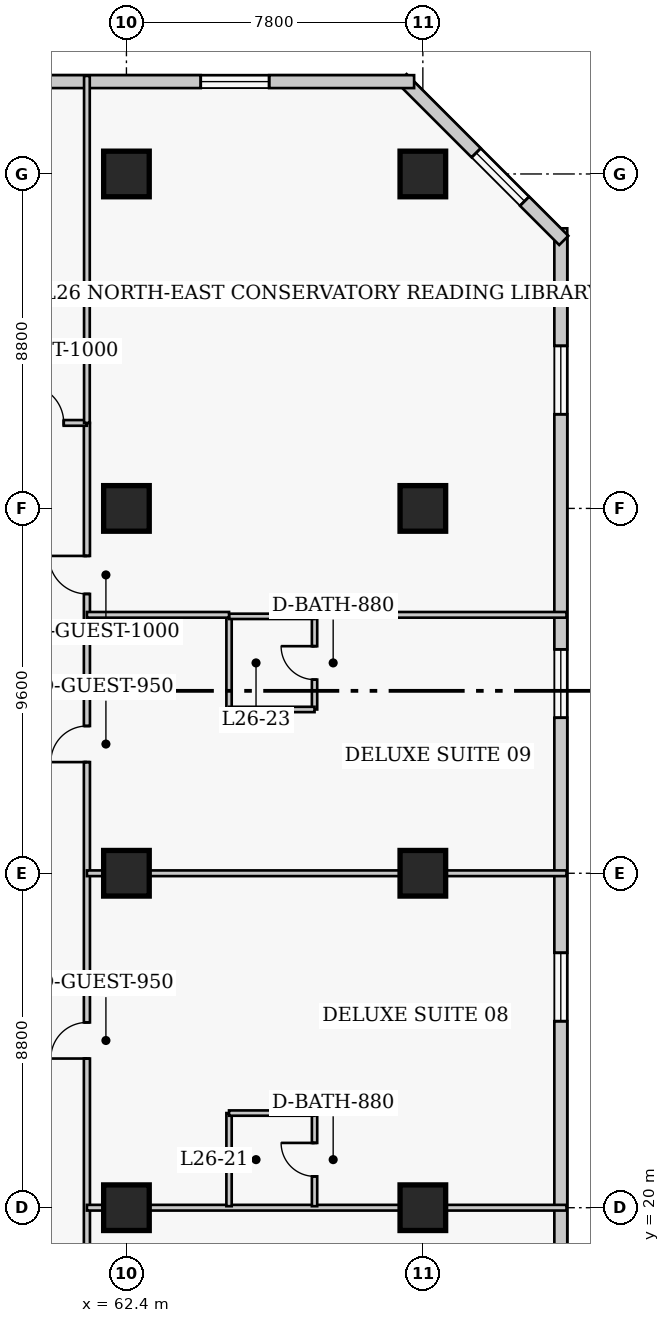
"""IFC4 building model, lengths in metres.
Left out: names, types, materials, properties, quantities, classifications, styles, units other than length and angle.
Written with IfcOpenShell. Run it as: python <this file> out.ifc"""

import sys

from ifc_helpers import new_model, si_unit, direction, frame, frame_2d, origin, origin_2d, place, context, subcontext, project, spatial, rectangle, extrude, element, fill, save


model = new_model("IFC4")
c1 = context("Model", 3, precision=1e-05, world=origin(), true_north=direction((0.0, 1.0)))
c2 = subcontext(c1, "Body", "Model", "MODEL_VIEW")
j1 = project(units=[si_unit("LENGTHUNIT", "METRE"), si_unit("PLANEANGLEUNIT", "RADIAN")], contexts=[c1])
p1 = place(None, origin())
s1 = spatial("IfcSite", under=j1, at=p1, CompositionType="ELEMENT")
p2 = place(p1, origin())
s2 = spatial("IfcBuilding", under=s1, at=p2, CompositionType="ELEMENT")
p3 = place(p2, frame((0.0, 0.0, 107.0)))
s3 = spatial("IfcBuildingStorey", under=s2, at=p3, CompositionType="ELEMENT", Elevation=107.0)
for number, where, z_axis, x_axis in (
    (1, (62.4, 20.0, 0.0), (0.0, 0.0, 1.0), (1.0, 0.0, 0.0)),
    (2, (62.4, 28.8, 0.0), (0.0, 0.0, 1.0), (1.0, 0.0, 0.0)),
    (3, (62.4, 38.4, 0.0), (0.0, 0.0, 1.0), (1.0, 0.0, 0.0)),
    (4, (62.4, 47.2, 0.0), (0.0, 0.0, 1.0), (1.0, 0.0, 0.0)),
    (5, (70.2, 20.0, 0.0), (0.0, 0.0, 1.0), (1.0, 0.0, 0.0)),
    (6, (70.2, 28.8, 0.0), (0.0, 0.0, 1.0), (1.0, 0.0, 0.0)),
    (7, (70.2, 38.4, 0.0), (0.0, 0.0, 1.0), (1.0, 0.0, 0.0)),
    (8, (70.2, 47.2, 0.0), (0.0, 0.0, 1.0), (1.0, 0.0, 0.0)),
):
    element("IfcColumn", number, at=place(p3, frame(where, z_axis=z_axis, x_axis=x_axis)), inside=s3, PredefinedType="COLUMN", context=c2, shape_type="SweptSolid", body=[
        extrude(rectangle(XDim=1.2, YDim=1.2, at=origin_2d()), origin(), (0.0, 0.0, 1.0), 3.8),
    ])
p4 = place(p3, frame((73.83, 13.83, 0.0), z_axis=(0.0, 0.0, 1.0), x_axis=(0.0, 1.0, 0.0)))
e9 = element("IfcWall", 9, at=p4, inside=s3, PredefinedType="SOLIDWALL", context=c2, shape_type="SweptSolid", body=[
    extrude(rectangle(XDim=31.94, YDim=0.34, at=frame_2d((15.97, 0.0))), origin(), (0.0, 0.0, 1.0), 3.54),
])
p5 = place(p4, frame((3.093, 0.0, 0.85)))
e10 = element("IfcOpeningElement", 10, at=p5, cuts=e9, PredefinedType="OPENING", context=c2, shape_type="SweptSolid", body=[
    extrude(rectangle(XDim=1.8, YDim=1.8, at=frame_2d((0.9, 0.9))), frame((0.0, 0.18, 0.0), z_axis=(0.0, -1.0, 0.0), x_axis=(1.0, 0.0, 0.0)), (0.0, 0.0, 1.0), 0.36),
])
p6 = place(p4, frame((11.077, 0.0, 0.85)))
e11 = element("IfcOpeningElement", 11, at=p6, cuts=e9, PredefinedType="OPENING", context=c2, shape_type="SweptSolid", body=[
    extrude(rectangle(XDim=1.8, YDim=1.8, at=frame_2d((0.9, 0.9))), frame((0.0, 0.18, 0.0), z_axis=(0.0, -1.0, 0.0), x_axis=(1.0, 0.0, 0.0)), (0.0, 0.0, 1.0), 0.36),
])
p7 = place(p4, frame((19.062, 0.0, 0.85)))
e12 = element("IfcOpeningElement", 12, at=p7, cuts=e9, PredefinedType="OPENING", context=c2, shape_type="SweptSolid", body=[
    extrude(rectangle(XDim=1.8, YDim=1.8, at=frame_2d((0.9, 0.9))), frame((0.0, 0.18, 0.0), z_axis=(0.0, -1.0, 0.0), x_axis=(1.0, 0.0, 0.0)), (0.0, 0.0, 1.0), 0.36),
])
p8 = place(p4, frame((27.048, 0.0, 0.85)))
e13 = element("IfcOpeningElement", 13, at=p8, cuts=e9, PredefinedType="OPENING", context=c2, shape_type="SweptSolid", body=[
    extrude(rectangle(XDim=1.8, YDim=1.8, at=frame_2d((0.9, 0.9))), frame((0.0, 0.18, 0.0), z_axis=(0.0, -1.0, 0.0), x_axis=(1.0, 0.0, 0.0)), (0.0, 0.0, 1.0), 0.36),
])
p9 = place(p3, frame((73.908, 45.451, 0.0), z_axis=(0.0, 0.0, 1.0), x_axis=(-0.707106781187, 0.707106781187, 0.0)))
e14 = element("IfcWall", 14, at=p9, inside=s3, PredefinedType="SOLIDWALL", context=c2, shape_type="SweptSolid", body=[
    extrude(rectangle(XDim=6.02, YDim=0.34, at=frame_2d((3.01, 0.0))), origin(), (0.0, 0.0, 1.0), 3.54),
])
p10 = place(p9, frame((1.46, 0.0, 0.85)))
e15 = element("IfcOpeningElement", 15, at=p10, cuts=e14, PredefinedType="OPENING", context=c2, shape_type="SweptSolid", body=[
    extrude(rectangle(XDim=1.8, YDim=1.8, at=frame_2d((0.9, 0.9))), frame((0.0, 0.18, 0.0), z_axis=(0.0, -1.0, 0.0), x_axis=(1.0, 0.0, 0.0)), (0.0, 0.0, 1.0), 0.36),
])
p11 = place(p3, frame((69.97, 49.63, 0.0), z_axis=(0.0, 0.0, 1.0), x_axis=(-1.0, 0.0, 0.0)))
e16 = element("IfcWall", 16, at=p11, inside=s3, PredefinedType="SOLIDWALL", context=c2, shape_type="SweptSolid", body=[
    extrude(rectangle(XDim=28.29, YDim=0.34, at=frame_2d((14.145, 0.0))), origin(), (0.0, 0.0, 1.0), 3.54),
])
p12 = place(p11, frame((3.815, 0.0, 0.85)))
e17 = element("IfcOpeningElement", 17, at=p12, cuts=e16, PredefinedType="OPENING", context=c2, shape_type="SweptSolid", body=[
    extrude(rectangle(XDim=1.8, YDim=1.8, at=frame_2d((0.9, 0.9))), frame((0.0, 0.18, 0.0), z_axis=(0.0, -1.0, 0.0), x_axis=(1.0, 0.0, 0.0)), (0.0, 0.0, 1.0), 0.36),
])
p13 = place(p11, frame((13.245, 0.0, 0.85)))
e18 = element("IfcOpeningElement", 18, at=p13, cuts=e16, PredefinedType="OPENING", context=c2, shape_type="SweptSolid", body=[
    extrude(rectangle(XDim=1.8, YDim=1.8, at=frame_2d((0.9, 0.9))), frame((0.0, 0.18, 0.0), z_axis=(0.0, -1.0, 0.0), x_axis=(1.0, 0.0, 0.0)), (0.0, 0.0, 1.0), 0.36),
])
p14 = place(p11, frame((22.675, 0.0, 0.85)))
e19 = element("IfcOpeningElement", 19, at=p14, cuts=e16, PredefinedType="OPENING", context=c2, shape_type="SweptSolid", body=[
    extrude(rectangle(XDim=1.8, YDim=1.8, at=frame_2d((0.9, 0.9))), frame((0.0, 0.18, 0.0), z_axis=(0.0, -1.0, 0.0), x_axis=(1.0, 0.0, 0.0)), (0.0, 0.0, 1.0), 0.36),
])
p15 = place(p3, frame((61.36, 11.85, 0.0), z_axis=(0.0, 0.0, 1.0), x_axis=(0.0, 1.0, 0.0)))
e20 = element("IfcWall", 20, at=p15, inside=s3, PredefinedType="PARTITIONING", context=c2, shape_type="SweptSolid", body=[
    extrude(rectangle(XDim=28.8, YDim=0.16, at=frame_2d((14.4, 0.0))), origin(), (0.0, 0.0, 1.0), 3.54),
])
p16 = place(p15, frame((3.6, 0.0, 0.0)))
e21 = element("IfcOpeningElement", 21, at=p16, cuts=e20, PredefinedType="OPENING", context=c2, shape_type="SweptSolid", body=[
    extrude(rectangle(XDim=0.95, YDim=2.1, at=frame_2d((0.475, 1.05))), frame((0.0, 0.09, 0.0), z_axis=(0.0, -1.0, 0.0), x_axis=(1.0, 0.0, 0.0)), (0.0, 0.0, 1.0), 0.18),
])
p17 = place(p15, frame((12.075, 0.0, 0.0)))
e22 = element("IfcOpeningElement", 22, at=p17, cuts=e20, PredefinedType="OPENING", context=c2, shape_type="SweptSolid", body=[
    extrude(rectangle(XDim=0.95, YDim=2.1, at=frame_2d((0.475, 1.05))), frame((0.0, 0.09, 0.0), z_axis=(0.0, -1.0, 0.0), x_axis=(1.0, 0.0, 0.0)), (0.0, 0.0, 1.0), 0.18),
])
p18 = place(p15, frame((19.875, 0.0, 0.0)))
e23 = element("IfcOpeningElement", 23, at=p18, cuts=e20, PredefinedType="OPENING", context=c2, shape_type="SweptSolid", body=[
    extrude(rectangle(XDim=0.95, YDim=2.1, at=frame_2d((0.475, 1.05))), frame((0.0, 0.09, 0.0), z_axis=(0.0, -1.0, 0.0), x_axis=(1.0, 0.0, 0.0)), (0.0, 0.0, 1.0), 0.18),
])
p19 = place(p15, frame((24.3, 0.0, 0.0)))
e24 = element("IfcOpeningElement", 24, at=p19, cuts=e20, PredefinedType="OPENING", context=c2, shape_type="SweptSolid", body=[
    extrude(rectangle(XDim=1.0, YDim=2.15, at=frame_2d((0.5, 1.075))), frame((0.0, 0.09, 0.0), z_axis=(0.0, -1.0, 0.0), x_axis=(1.0, 0.0, 0.0)), (0.0, 0.0, 1.0), 0.18),
])
p20 = place(p3, frame((56.8, 40.65, 0.0), z_axis=(0.0, 0.0, 1.0), x_axis=(1.0, 0.0, 0.0)))
e25 = element("IfcWall", 25, at=p20, inside=s3, PredefinedType="PARTITIONING", context=c2, shape_type="SweptSolid", body=[
    extrude(rectangle(XDim=4.56, YDim=0.15, at=frame_2d((2.28, 0.0))), origin(), (0.0, 0.0, 1.0), 3.54),
])
p21 = place(p20, frame((2.95, 0.0, 0.0)))
e26 = element("IfcOpeningElement", 26, at=p21, cuts=e25, PredefinedType="OPENING", context=c2, shape_type="SweptSolid", body=[
    extrude(rectangle(XDim=1.0, YDim=2.15, at=frame_2d((0.5, 1.075))), frame((0.0, 0.085, 0.0), z_axis=(0.0, -1.0, 0.0), x_axis=(1.0, 0.0, 0.0)), (0.0, 0.0, 1.0), 0.17),
])
p22 = place(p3, frame((61.36, 40.65, 0.0), z_axis=(0.0, 0.0, 1.0), x_axis=(0.0, 1.0, 0.0)))
e27 = element("IfcWall", 27, at=p22, inside=s3, PredefinedType="PARTITIONING", context=c2, shape_type="SweptSolid", body=[
    extrude(rectangle(XDim=9.13, YDim=0.15, at=frame_2d((4.565, 0.0))), origin(), (0.0, 0.0, 1.0), 3.54),
])
p23 = place(p3, frame((61.36, 20.0, 0.0), z_axis=(0.0, 0.0, 1.0), x_axis=(1.0, 0.0, 0.0)))
e28 = element("IfcWall", 28, at=p23, inside=s3, PredefinedType="PARTITIONING", context=c2, shape_type="SweptSolid", body=[
    extrude(rectangle(XDim=12.62, YDim=0.15, at=frame_2d((6.31, 0.0))), origin(), (0.0, 0.0, 1.0), 2.679),
])
p24 = place(p3, frame((65.1, 20.04, 0.0), z_axis=(0.0, 0.0, 1.0), x_axis=(0.0, 1.0, 0.0)))
e29 = element("IfcWall", 29, at=p24, inside=s3, PredefinedType="PLUMBINGWALL", context=c2, shape_type="SweptSolid", body=[
    extrude(rectangle(XDim=2.45, YDim=0.14, at=frame_2d((1.225, 0.0))), origin(), (0.0, 0.0, 1.0), 3.54),
])
p25 = place(p3, frame((67.35, 20.04, 0.0), z_axis=(0.0, 0.0, 1.0), x_axis=(0.0, 1.0, 0.0)))
e30 = element("IfcWall", 30, at=p25, inside=s3, PredefinedType="PLUMBINGWALL", context=c2, shape_type="SweptSolid", body=[
    extrude(rectangle(XDim=2.45, YDim=0.14, at=frame_2d((1.225, 0.0))), origin(), (0.0, 0.0, 1.0), 3.54),
])
p26 = place(p25, frame((0.785, 0.0, 0.0)))
e31 = element("IfcOpeningElement", 31, at=p26, cuts=e30, PredefinedType="OPENING", context=c2, shape_type="SweptSolid", body=[
    extrude(rectangle(XDim=0.88, YDim=2.05, at=frame_2d((0.44, 1.025))), frame((0.0, 0.08, 0.0), z_axis=(0.0, -1.0, 0.0), x_axis=(1.0, 0.0, 0.0)), (0.0, 0.0, 1.0), 0.16),
])
p27 = place(p3, frame((65.1, 22.49, 0.0), z_axis=(0.0, 0.0, 1.0), x_axis=(1.0, 0.0, 0.0)))
e32 = element("IfcWall", 32, at=p27, inside=s3, PredefinedType="PLUMBINGWALL", context=c2, shape_type="SweptSolid", body=[
    extrude(rectangle(XDim=2.25, YDim=0.14, at=frame_2d((1.125, 0.0))), origin(), (0.0, 0.0, 1.0), 3.54),
])
p28 = place(p3, frame((61.36, 28.8, 0.0), z_axis=(0.0, 0.0, 1.0), x_axis=(1.0, 0.0, 0.0)))
e33 = element("IfcWall", 33, at=p28, inside=s3, PredefinedType="PARTITIONING", context=c2, shape_type="SweptSolid", body=[
    extrude(rectangle(XDim=12.62, YDim=0.15, at=frame_2d((6.31, 0.0))), origin(), (0.0, 0.0, 1.0), 2.679),
])
p29 = place(p3, frame((65.1, 33.11, 0.0), z_axis=(0.0, 0.0, 1.0), x_axis=(0.0, 1.0, 0.0)))
e34 = element("IfcWall", 34, at=p29, inside=s3, PredefinedType="PLUMBINGWALL", context=c2, shape_type="SweptSolid", body=[
    extrude(rectangle(XDim=2.45, YDim=0.14, at=frame_2d((1.225, 0.0))), origin(), (0.0, 0.0, 1.0), 3.54),
])
p30 = place(p3, frame((67.35, 33.11, 0.0), z_axis=(0.0, 0.0, 1.0), x_axis=(0.0, 1.0, 0.0)))
e35 = element("IfcWall", 35, at=p30, inside=s3, PredefinedType="PLUMBINGWALL", context=c2, shape_type="SweptSolid", body=[
    extrude(rectangle(XDim=2.45, YDim=0.14, at=frame_2d((1.225, 0.0))), origin(), (0.0, 0.0, 1.0), 3.54),
])
p31 = place(p30, frame((0.785, 0.0, 0.0)))
e36 = element("IfcOpeningElement", 36, at=p31, cuts=e35, PredefinedType="OPENING", context=c2, shape_type="SweptSolid", body=[
    extrude(rectangle(XDim=0.88, YDim=2.05, at=frame_2d((0.44, 1.025))), frame((0.0, 0.08, 0.0), z_axis=(0.0, -1.0, 0.0), x_axis=(1.0, 0.0, 0.0)), (0.0, 0.0, 1.0), 0.16),
])
for number, where, z_axis, x_axis in (
    (37, (65.1, 33.11, 0.0), (0.0, 0.0, 1.0), (1.0, 0.0, 0.0)),
    (38, (65.1, 35.56, 0.0), (0.0, 0.0, 1.0), (1.0, 0.0, 0.0)),
):
    element("IfcWall", number, at=place(p3, frame(where, z_axis=z_axis, x_axis=x_axis)), inside=s3, PredefinedType="PLUMBINGWALL", context=c2, shape_type="SweptSolid", body=[
        extrude(rectangle(XDim=2.25, YDim=0.14, at=frame_2d((1.125, 0.0))), origin(), (0.0, 0.0, 1.0), 3.54),
    ])
p32 = place(p3, frame((61.36, 35.6, 0.0), z_axis=(0.0, 0.0, 1.0), x_axis=(1.0, 0.0, 0.0)))
e39 = element("IfcWall", 39, at=p32, inside=s3, PredefinedType="PARTITIONING", context=c2, shape_type="SweptSolid", body=[
    extrude(rectangle(XDim=3.74, YDim=0.15, at=frame_2d((1.87, 0.0))), origin(), (0.0, 0.0, 1.0), 3.54),
])
p33 = place(p3, frame((67.35, 35.6, 0.0), z_axis=(0.0, 0.0, 1.0), x_axis=(1.0, 0.0, 0.0)))
e40 = element("IfcWall", 40, at=p33, inside=s3, PredefinedType="PARTITIONING", context=c2, shape_type="SweptSolid", body=[
    extrude(rectangle(XDim=6.63, YDim=0.15, at=frame_2d((3.315, 0.0))), origin(), (0.0, 0.0, 1.0), 3.54),
])
p34 = place(p6, origin())
e41 = element("IfcWindow", 41, at=p34, inside=s3, PartitioningType="SINGLE_PANEL", PredefinedType="WINDOW", context=c2, shape_type="SweptSolid", body=[
    extrude(rectangle(XDim=1.8, YDim=1.8, at=frame_2d((0.9, 0.9))), frame((0.0, 0.03, 0.0), z_axis=(0.0, -1.0, 0.0), x_axis=(1.0, 0.0, 0.0)), (0.0, 0.0, 1.0), 0.06),
])
fill(e11, e41)
p35 = place(p7, origin())
e42 = element("IfcWindow", 42, at=p35, inside=s3, PartitioningType="SINGLE_PANEL", PredefinedType="WINDOW", context=c2, shape_type="SweptSolid", body=[
    extrude(rectangle(XDim=1.8, YDim=1.8, at=frame_2d((0.9, 0.9))), frame((0.0, 0.03, 0.0), z_axis=(0.0, -1.0, 0.0), x_axis=(1.0, 0.0, 0.0)), (0.0, 0.0, 1.0), 0.06),
])
fill(e12, e42)
p36 = place(p8, origin())
e43 = element("IfcWindow", 43, at=p36, inside=s3, PartitioningType="SINGLE_PANEL", PredefinedType="WINDOW", context=c2, shape_type="SweptSolid", body=[
    extrude(rectangle(XDim=1.8, YDim=1.8, at=frame_2d((0.9, 0.9))), frame((0.0, 0.03, 0.0), z_axis=(0.0, -1.0, 0.0), x_axis=(1.0, 0.0, 0.0)), (0.0, 0.0, 1.0), 0.06),
])
fill(e13, e43)
p37 = place(p10, origin())
e44 = element("IfcWindow", 44, at=p37, inside=s3, PartitioningType="SINGLE_PANEL", PredefinedType="WINDOW", context=c2, shape_type="SweptSolid", body=[
    extrude(rectangle(XDim=1.8, YDim=1.8, at=frame_2d((0.9, 0.9))), frame((0.0, 0.03, 0.0), z_axis=(0.0, -1.0, 0.0), x_axis=(1.0, 0.0, 0.0)), (0.0, 0.0, 1.0), 0.06),
])
fill(e15, e44)
p38 = place(p12, origin())
e45 = element("IfcWindow", 45, at=p38, inside=s3, PartitioningType="SINGLE_PANEL", PredefinedType="WINDOW", context=c2, shape_type="SweptSolid", body=[
    extrude(rectangle(XDim=1.8, YDim=1.8, at=frame_2d((0.9, 0.9))), frame((0.0, 0.03, 0.0), z_axis=(0.0, -1.0, 0.0), x_axis=(1.0, 0.0, 0.0)), (0.0, 0.0, 1.0), 0.06),
])
fill(e17, e45)
p39 = place(p21, origin())
e46 = element("IfcDoor", 46, at=p39, inside=s3, OperationType="SINGLE_SWING_LEFT", PredefinedType="DOOR", context=c2, shape_type="SweptSolid", body=[
    extrude(rectangle(XDim=1.0, YDim=2.15, at=frame_2d((0.5, 1.075))), frame((0.0, 0.025, 0.0), z_axis=(0.0, -1.0, 0.0), x_axis=(1.0, 0.0, 0.0)), (0.0, 0.0, 1.0), 0.05),
])
fill(e26, e46)
p40 = place(p26, origin())
e47 = element("IfcDoor", 47, at=p40, inside=s3, OperationType="SINGLE_SWING_RIGHT", PredefinedType="DOOR", context=c2, shape_type="SweptSolid", body=[
    extrude(rectangle(XDim=0.88, YDim=2.05, at=frame_2d((0.44, 1.025))), frame((0.0, 0.025, 0.0), z_axis=(0.0, -1.0, 0.0), x_axis=(1.0, 0.0, 0.0)), (0.0, 0.0, 1.0), 0.05),
])
fill(e31, e47)
p41 = place(p17, origin())
e48 = element("IfcDoor", 48, at=p41, inside=s3, OperationType="SINGLE_SWING_LEFT", PredefinedType="DOOR", context=c2, shape_type="SweptSolid", body=[
    extrude(rectangle(XDim=0.95, YDim=2.1, at=frame_2d((0.475, 1.05))), frame((0.0, 0.025, 0.0), z_axis=(0.0, -1.0, 0.0), x_axis=(1.0, 0.0, 0.0)), (0.0, 0.0, 1.0), 0.05),
])
fill(e22, e48)
p42 = place(p31, origin())
e49 = element("IfcDoor", 49, at=p42, inside=s3, OperationType="SINGLE_SWING_RIGHT", PredefinedType="DOOR", context=c2, shape_type="SweptSolid", body=[
    extrude(rectangle(XDim=0.88, YDim=2.05, at=frame_2d((0.44, 1.025))), frame((0.0, 0.025, 0.0), z_axis=(0.0, -1.0, 0.0), x_axis=(1.0, 0.0, 0.0)), (0.0, 0.0, 1.0), 0.05),
])
fill(e36, e49)
p43 = place(p18, origin())
e50 = element("IfcDoor", 50, at=p43, inside=s3, OperationType="SINGLE_SWING_LEFT", PredefinedType="DOOR", context=c2, shape_type="SweptSolid", body=[
    extrude(rectangle(XDim=0.95, YDim=2.1, at=frame_2d((0.475, 1.05))), frame((0.0, 0.025, 0.0), z_axis=(0.0, -1.0, 0.0), x_axis=(1.0, 0.0, 0.0)), (0.0, 0.0, 1.0), 0.05),
])
fill(e23, e50)
p44 = place(p19, origin())
e51 = element("IfcDoor", 51, at=p44, inside=s3, OperationType="SINGLE_SWING_RIGHT", PredefinedType="DOOR", context=c2, shape_type="SweptSolid", body=[
    extrude(rectangle(XDim=1.0, YDim=2.15, at=frame_2d((0.5, 1.075))), frame((0.0, 0.025, 0.0), z_axis=(0.0, -1.0, 0.0), x_axis=(1.0, 0.0, 0.0)), (0.0, 0.0, 1.0), 0.05),
])
fill(e24, e51)
save(model, sys.argv[1])
